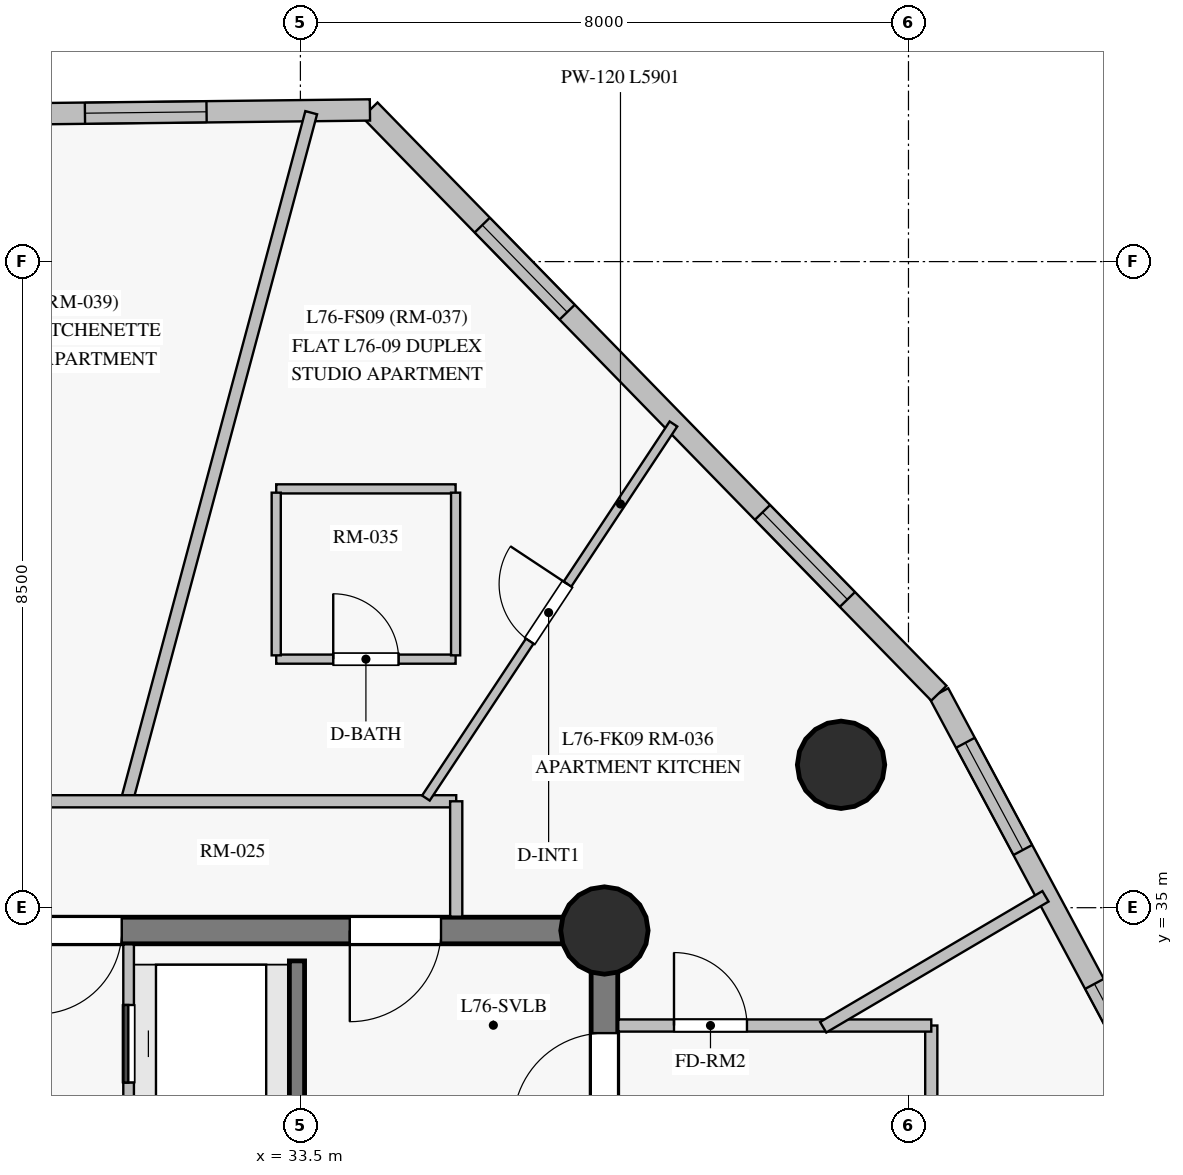
"""IFC4 building model, lengths in metres.
Left out: names, types, materials, properties, quantities, classifications, styles, units other than length and angle.
Written with IfcOpenShell. Run it as: python <this file> out.ifc"""

import sys

from ifc_helpers import new_model, si_unit, direction, frame, frame_2d, origin, origin_with_axes, origin_2d, place, context, subcontext, project, spatial, rectangle, circle, extrude, source, transform, mapped, element, fill, save


model = new_model("IFC4")
c1 = context("Model", 3, precision=1e-05, world=origin(), true_north=direction((0.0, 1.0)))
c2 = subcontext(c1, "Body", "Model", "MODEL_VIEW")
j1 = project(units=[si_unit("LENGTHUNIT", "METRE"), si_unit("PLANEANGLEUNIT", "RADIAN")], contexts=[c1])
p1 = place(None, origin())
s1 = spatial("IfcSite", under=j1, at=p1, CompositionType="ELEMENT")
p2 = place(p1, origin())
s2 = spatial("IfcBuilding", under=s1, at=p2, CompositionType="ELEMENT")
p3 = place(p2, frame((0.0, 0.0, 256.55)))
s3 = spatial("IfcBuildingStorey", under=s2, at=p3, CompositionType="ELEMENT", Elevation=256.55)
p4 = place(p3, frame((37.5, 18.3, 0.0), z_axis=(0.0, 0.0, 1.0), x_axis=(0.0, 1.0, 0.0)))
e1 = element("IfcWall", 1, at=p4, inside=s3, PredefinedType="SHEAR", context=c2, shape_type="SweptSolid", body=[
    extrude(rectangle(XDim=16.4, YDim=0.35, at=frame_2d((8.2, 0.0))), origin(), (0.0, 0.0, 1.0), 2.85),
])
p5 = place(p4, frame((13.85, 0.0, 0.0)))
e2 = element("IfcOpeningElement", 2, at=p5, cuts=e1, PredefinedType="OPENING", context=c2, shape_type="SweptSolid", body=[
    extrude(rectangle(XDim=1.2, YDim=2.15, at=frame_2d((0.6, 1.075))), frame((0.0, 0.185, 0.0), z_axis=(0.0, -1.0, 0.0), x_axis=(1.0, 0.0, 0.0)), (0.0, 0.0, 1.0), 0.37),
])
p6 = place(p3, frame((37.5, 34.7, 0.0), z_axis=(0.0, 0.0, 1.0), x_axis=(-1.0, 0.0, 0.0)))
e3 = element("IfcWall", 3, at=p6, inside=s3, PredefinedType="SHEAR", context=c2, shape_type="SweptSolid", body=[
    extrude(rectangle(XDim=10.95, YDim=0.35, at=frame_2d((5.475, 0.0))), origin(), (0.0, 0.0, 1.0), 2.85),
])
p7 = place(p6, frame((2.15, 0.0, 0.0)))
e4 = element("IfcOpeningElement", 4, at=p7, cuts=e3, PredefinedType="OPENING", context=c2, shape_type="SweptSolid", body=[
    extrude(rectangle(XDim=1.2, YDim=2.15, at=frame_2d((0.6, 1.075))), frame((0.0, 0.185, 0.0), z_axis=(0.0, -1.0, 0.0), x_axis=(1.0, 0.0, 0.0)), (0.0, 0.0, 1.0), 0.37),
])
p8 = place(p6, frame((6.35, 0.0, 0.0)))
e5 = element("IfcOpeningElement", 5, at=p8, cuts=e3, PredefinedType="OPENING", context=c2, shape_type="SweptSolid", body=[
    extrude(rectangle(XDim=1.1, YDim=2.15, at=frame_2d((0.55, 1.075))), frame((0.0, 0.185, 0.0), z_axis=(0.0, -1.0, 0.0), x_axis=(1.0, 0.0, 0.0)), (0.0, 0.0, 1.0), 0.37),
])
m1 = source(origin_with_axes(), c2, "Body", "SweptSolid", [
    extrude(circle(Radius=0.575, at=origin_2d()), origin(), (0.0, 0.0, 1.0), 3.05),
])
for number, where, z_axis, x_axis in (
    (6, (37.5, 34.7, 0.0), (0.0, 0.0, 1.0), (1.0, 0.0, 0.0)),
    (7, (40.613, 36.88, 0.0), (0.0, 0.0, 1.0), (1.0, 0.0, 0.0)),
):
    element("IfcColumn", number, at=place(p3, frame(where, z_axis=z_axis, x_axis=x_axis)), inside=s3, PredefinedType="COLUMN", context=c2, shape_type="MappedRepresentation", body=[
        mapped(m1, transform((0.0, 0.0, 0.0), scale=1.0)),
    ])
p9 = place(p3, frame((45.352, 31.372, 0.0), z_axis=(0.0, 0.0, 1.0), x_axis=(-0.471937066775, 0.881632239091, 0.0)))
e8 = element("IfcWall", 8, at=p9, inside=s3, PredefinedType="SOLIDWALL", context=c2, shape_type="SweptSolid", body=[
    extrude(rectangle(XDim=7.315, YDim=0.28, at=frame_2d((3.658, 0.0))), origin(), (0.0, 0.0, 1.0), 2.85),
])
p10 = place(p9, frame((1.378, 0.0, 0.85)))
e9 = element("IfcOpeningElement", 9, at=p10, cuts=e8, PredefinedType="OPENING", context=c2, shape_type="SweptSolid", body=[
    extrude(rectangle(XDim=1.6, YDim=1.6, at=frame_2d((0.8, 0.8))), frame((0.0, 0.15, 0.0), z_axis=(0.0, -1.0, 0.0), x_axis=(1.0, 0.0, 0.0)), (0.0, 0.0, 1.0), 0.3),
])
p11 = place(p9, frame((4.976, 0.0, 0.85)))
e10 = element("IfcOpeningElement", 10, at=p11, cuts=e8, PredefinedType="OPENING", context=c2, shape_type="SweptSolid", body=[
    extrude(rectangle(XDim=1.6, YDim=1.6, at=frame_2d((0.8, 0.8))), frame((0.0, 0.15, 0.0), z_axis=(0.0, -1.0, 0.0), x_axis=(1.0, 0.0, 0.0)), (0.0, 0.0, 1.0), 0.3),
])
p12 = place(p3, frame((41.9, 37.822, 0.0), z_axis=(0.0, 0.0, 1.0), x_axis=(-0.698260952417, 0.715843308504, 0.0)))
e11 = element("IfcWall", 11, at=p12, inside=s3, PredefinedType="SOLIDWALL", context=c2, shape_type="SweptSolid", body=[
    extrude(rectangle(XDim=10.72, YDim=0.28, at=frame_2d((5.36, 0.0))), origin(), (0.0, 0.0, 1.0), 2.85),
])
p13 = place(p12, frame((1.723, 0.0, 0.85)))
e12 = element("IfcOpeningElement", 12, at=p13, cuts=e11, PredefinedType="OPENING", context=c2, shape_type="SweptSolid", body=[
    extrude(rectangle(XDim=1.6, YDim=1.6, at=frame_2d((0.8, 0.8))), frame((0.0, 0.15, 0.0), z_axis=(0.0, -1.0, 0.0), x_axis=(1.0, 0.0, 0.0)), (0.0, 0.0, 1.0), 0.3),
])
p14 = place(p12, frame((7.003, 0.0, 0.85)))
e13 = element("IfcOpeningElement", 13, at=p14, cuts=e11, PredefinedType="OPENING", context=c2, shape_type="SweptSolid", body=[
    extrude(rectangle(XDim=1.6, YDim=1.6, at=frame_2d((0.8, 0.8))), frame((0.0, 0.15, 0.0), z_axis=(0.0, -1.0, 0.0), x_axis=(1.0, 0.0, 0.0)), (0.0, 0.0, 1.0), 0.3),
])
p15 = place(p3, frame((34.415, 45.495, 0.0), z_axis=(0.0, 0.0, 1.0), x_axis=(-0.999934770343, -0.011421692439, 0.0)))
e14 = element("IfcWall", 14, at=p15, inside=s3, PredefinedType="SOLIDWALL", context=c2, shape_type="SweptSolid", body=[
    extrude(rectangle(XDim=8.871, YDim=0.28, at=frame_2d((4.435, 0.0))), origin(), (0.0, 0.0, 1.0), 2.85),
])
p16 = place(p15, frame((2.149, 0.0, 0.85)))
e15 = element("IfcOpeningElement", 15, at=p16, cuts=e14, PredefinedType="OPENING", context=c2, shape_type="SweptSolid", body=[
    extrude(rectangle(XDim=1.6, YDim=1.6, at=frame_2d((0.8, 0.8))), frame((0.0, 0.15, 0.0), z_axis=(0.0, -1.0, 0.0), x_axis=(1.0, 0.0, 0.0)), (0.0, 0.0, 1.0), 0.3),
])
p17 = place(p15, frame((5.844, 0.0, 0.85)))
e16 = element("IfcOpeningElement", 16, at=p17, cuts=e14, PredefinedType="OPENING", context=c2, shape_type="SweptSolid", body=[
    extrude(rectangle(XDim=1.6, YDim=1.6, at=frame_2d((0.8, 0.8))), frame((0.0, 0.15, 0.0), z_axis=(0.0, -1.0, 0.0), x_axis=(1.0, 0.0, 0.0)), (0.0, 0.0, 1.0), 0.3),
])
p18 = place(p3, frame((33.455, 18.7, 0.0), z_axis=(0.0, 0.0, 1.0), x_axis=(0.0, 1.0, 0.0)))
e17 = element("IfcWall", 17, at=p18, inside=s3, PredefinedType="SHEAR", context=c2, shape_type="SweptSolid", body=[
    extrude(rectangle(XDim=15.6, YDim=0.2, at=frame_2d((7.8, 0.0))), origin(), (0.0, 0.0, 1.0), 2.85),
])
p19 = place(p18, frame((2.75, 0.0, 0.0)))
e18 = element("IfcOpeningElement", 18, at=p19, cuts=e17, PredefinedType="OPENING", context=c2, shape_type="SweptSolid", body=[
    extrude(rectangle(XDim=1.15, YDim=2.15, at=frame_2d((0.575, 1.075))), frame((0.0, 0.11, 0.0), z_axis=(0.0, -1.0, 0.0), x_axis=(1.0, 0.0, 0.0)), (0.0, 0.0, 1.0), 0.22),
])
p20 = place(p18, frame((0.55, 0.0, 0.0)))
e19 = element("IfcOpeningElement", 19, at=p20, cuts=e17, PredefinedType="OPENING", context=c2, shape_type="SweptSolid", body=[
    extrude(rectangle(XDim=0.94, YDim=2.1, at=frame_2d((0.47, 1.05))), frame((0.0, 0.11, 0.0), z_axis=(0.0, -1.0, 0.0), x_axis=(1.0, 0.0, 0.0)), (0.0, 0.0, 1.0), 0.22),
])
p21 = place(p3, frame((41.8, 33.45, 0.0), z_axis=(0.0, 0.0, 1.0), x_axis=(0.0, -1.0, 0.0)))
e20 = element("IfcWall", 20, at=p21, inside=s3, PredefinedType="PARTITIONING", context=c2, shape_type="SweptSolid", body=[
    extrude(rectangle(XDim=19.6, YDim=0.16, at=frame_2d((9.8, 0.0))), origin(), (0.0, 0.0, 1.0), 2.3),
])
p22 = place(p21, frame((9.325, 0.0, 0.0)))
e21 = element("IfcOpeningElement", 21, at=p22, cuts=e20, PredefinedType="OPENING", context=c2, shape_type="SweptSolid", body=[
    extrude(rectangle(XDim=0.96, YDim=2.15, at=frame_2d((0.48, 1.075))), frame((0.0, 0.09, 0.0), z_axis=(0.0, -1.0, 0.0), x_axis=(1.0, 0.0, 0.0)), (0.0, 0.0, 1.0), 0.18),
])
p23 = place(p21, frame((4.335, 0.0, 0.0)))
e22 = element("IfcOpeningElement", 22, at=p23, cuts=e20, PredefinedType="OPENING", context=c2, shape_type="SweptSolid", body=[
    extrude(rectangle(XDim=0.96, YDim=2.15, at=frame_2d((0.48, 1.075))), frame((0.0, 0.09, 0.0), z_axis=(0.0, -1.0, 0.0), x_axis=(1.0, 0.0, 0.0)), (0.0, 0.0, 1.0), 0.18),
])
p24 = place(p3, frame((31.207, 36.371, 0.0), z_axis=(0.0, 0.0, 1.0), x_axis=(0.258815637699, 0.965926739294, 0.0)))
e23 = element("IfcWall", 23, at=p24, inside=s3, PredefinedType="PARTITIONING", context=c2, shape_type="SweptSolid", body=[
    extrude(rectangle(XDim=9.408, YDim=0.16, at=frame_2d((4.704, 0.0))), origin(), (0.0, 0.0, 1.0), 2.85),
])
p25 = place(p3, frame((28.6, 36.4, 0.0), z_axis=(0.0, 0.0, 1.0), x_axis=(1.0, 0.0, 0.0)))
e24 = element("IfcWall", 24, at=p25, inside=s3, PredefinedType="PARTITIONING", context=c2, shape_type="SweptSolid", body=[
    extrude(rectangle(XDim=6.95, YDim=0.16, at=frame_2d((3.475, 0.0))), origin(), (0.0, 0.0, 1.0), 2.45),
])
p26 = place(p3, frame((35.151, 36.442, 0.0), z_axis=(0.0, 0.0, 1.0), x_axis=(0.551852093065, 0.833942004806, 0.0)))
e25 = element("IfcWall", 25, at=p26, inside=s3, PredefinedType="PARTITIONING", context=c2, shape_type="SweptSolid", body=[
    extrude(rectangle(XDim=5.902, YDim=0.12, at=frame_2d((2.951, 0.0))), origin(), (0.0, 0.0, 1.0), 2.85),
])
p27 = place(p26, frame((2.476, 0.0, 0.0)))
e26 = element("IfcOpeningElement", 26, at=p27, cuts=e25, PredefinedType="OPENING", context=c2, shape_type="SweptSolid", body=[
    extrude(rectangle(XDim=0.9, YDim=2.1, at=frame_2d((0.45, 1.05))), frame((0.0, 0.07, 0.0), z_axis=(0.0, -1.0, 0.0), x_axis=(1.0, 0.0, 0.0)), (0.0, 0.0, 1.0), 0.14),
])
p28 = place(p3, frame((37.682, 33.45, 0.0), z_axis=(0.0, 0.0, 1.0), x_axis=(1.0, 0.0, 0.0)))
e27 = element("IfcWall", 27, at=p28, inside=s3, PredefinedType="PARTITIONING", context=c2, shape_type="SweptSolid", body=[
    extrude(rectangle(XDim=4.118, YDim=0.16, at=frame_2d((2.059, 0.0))), origin(), (0.0, 0.0, 1.0), 2.85),
])
p29 = place(p28, frame((0.733, 0.0, 0.0)))
e28 = element("IfcOpeningElement", 28, at=p29, cuts=e27, PredefinedType="OPENING", context=c2, shape_type="SweptSolid", body=[
    extrude(rectangle(XDim=0.96, YDim=2.15, at=frame_2d((0.48, 1.075))), frame((0.0, 0.09, 0.0), z_axis=(0.0, -1.0, 0.0), x_axis=(1.0, 0.0, 0.0)), (0.0, 0.0, 1.0), 0.18),
])
p30 = place(p3, frame((31.24, 30.45, 0.0), z_axis=(0.0, 0.0, 1.0), x_axis=(0.0, 1.0, 0.0)))
e29 = element("IfcWall", 29, at=p30, inside=s3, PredefinedType="PARTITIONING", context=c2, shape_type="SweptSolid", body=[
    extrude(rectangle(XDim=4.068, YDim=0.14, at=frame_2d((2.034, 0.0))), origin(), (0.0, 0.0, 1.0), 2.85),
])
p31 = place(p30, frame((0.35, 0.0, 0.0)))
e30 = element("IfcOpeningElement", 30, at=p31, cuts=e29, PredefinedType="OPENING", context=c2, shape_type="SweptSolid", body=[
    extrude(rectangle(XDim=1.02, YDim=2.15, at=frame_2d((0.51, 1.075))), frame((0.0, 0.08, 0.0), z_axis=(0.0, -1.0, 0.0), x_axis=(1.0, 0.0, 0.0)), (0.0, 0.0, 1.0), 0.16),
])
p32 = place(p30, frame((2.25, 0.0, 0.0)))
e31 = element("IfcOpeningElement", 31, at=p32, cuts=e29, PredefinedType="OPENING", context=c2, shape_type="SweptSolid", body=[
    extrude(rectangle(XDim=1.02, YDim=2.15, at=frame_2d((0.51, 1.075))), frame((0.0, 0.08, 0.0), z_axis=(0.0, -1.0, 0.0), x_axis=(1.0, 0.0, 0.0)), (0.0, 0.0, 1.0), 0.16),
])
p33 = place(p3, frame((40.378, 33.427, 0.0), z_axis=(0.0, 0.0, 1.0), x_axis=(0.861628913846, 0.507538781597, 0.0)))
e32 = element("IfcWall", 32, at=p33, inside=s3, PredefinedType="PARTITIONING", context=c2, shape_type="SweptSolid", body=[
    extrude(rectangle(XDim=3.394, YDim=0.16, at=frame_2d((1.697, 0.0))), origin(), (0.0, 0.0, 1.0), 2.85),
])
p34 = place(p3, frame((33.182, 38.27, 0.0), z_axis=(0.0, 0.0, 1.0), x_axis=(1.0, 0.0, 0.0)))
e33 = element("IfcWall", 33, at=p34, inside=s3, PredefinedType="PARTITIONING", context=c2, shape_type="SweptSolid", body=[
    extrude(rectangle(XDim=2.36, YDim=0.12, at=frame_2d((1.18, 0.0))), origin(), (0.0, 0.0, 1.0), 2.3),
])
p35 = place(p34, frame((0.75, 0.0, 0.0)))
e34 = element("IfcOpeningElement", 34, at=p35, cuts=e33, PredefinedType="OPENING", context=c2, shape_type="SweptSolid", body=[
    extrude(rectangle(XDim=0.86, YDim=2.1, at=frame_2d((0.43, 1.05))), frame((0.0, 0.07, 0.0), z_axis=(0.0, -1.0, 0.0), x_axis=(1.0, 0.0, 0.0)), (0.0, 0.0, 1.0), 0.14),
])
p36 = place(p3, frame((35.542, 40.51, 0.0), z_axis=(0.0, 0.0, 1.0), x_axis=(-1.0, 0.0, 0.0)))
e35 = element("IfcWall", 35, at=p36, inside=s3, PredefinedType="PARTITIONING", context=c2, shape_type="SweptSolid", body=[
    extrude(rectangle(XDim=2.36, YDim=0.12, at=frame_2d((1.18, 0.0))), origin(), (0.0, 0.0, 1.0), 2.85),
])
for number, where, z_axis, x_axis in (
    (36, (35.542, 38.32, 0.0), (0.0, 0.0, 1.0), (0.0, 1.0, 0.0)),
    (37, (33.182, 40.46, 0.0), (0.0, 0.0, 1.0), (0.0, -1.0, 0.0)),
):
    element("IfcWall", number, at=place(p3, frame(where, z_axis=z_axis, x_axis=x_axis)), inside=s3, PredefinedType="PARTITIONING", context=c2, shape_type="SweptSolid", body=[
        extrude(rectangle(XDim=2.14, YDim=0.12, at=frame_2d((1.07, 0.0))), origin(), (0.0, 0.0, 1.0), 2.85),
    ])
p37 = place(p3, frame((35.55, 36.4, 0.0), z_axis=(0.0, 0.0, 1.0), x_axis=(0.0, -1.0, 0.0)))
e38 = element("IfcWall", 38, at=p37, inside=s3, PredefinedType="PARTITIONING", context=c2, shape_type="SweptSolid", body=[
    extrude(rectangle(XDim=1.518, YDim=0.16, at=frame_2d((0.759, 0.0))), origin(), (0.0, 0.0, 1.0), 2.85),
])
m2 = source(origin_with_axes(), c2, "Body", "SweptSolid", [
    extrude(rectangle(XDim=1.6, YDim=1.6, at=frame_2d((0.8, 0.8))), frame((0.0, 0.03, 0.0), z_axis=(0.0, -1.0, 0.0), x_axis=(1.0, 0.0, 0.0)), (0.0, 0.0, 1.0), 0.06),
])
p38 = place(p10, origin())
e39 = element("IfcWindow", 39, at=p38, inside=s3, PartitioningType="SINGLE_PANEL", PredefinedType="WINDOW", context=c2, shape_type="MappedRepresentation", body=[
    mapped(m2, transform((0.0, 0.0, 0.0), scale=1.0)),
])
fill(e9, e39)
p39 = place(p11, origin())
e40 = element("IfcWindow", 40, at=p39, inside=s3, PartitioningType="SINGLE_PANEL", PredefinedType="WINDOW", context=c2, shape_type="MappedRepresentation", body=[
    mapped(m2, transform((0.0, 0.0, 0.0), scale=1.0)),
])
fill(e10, e40)
p40 = place(p13, origin())
e41 = element("IfcWindow", 41, at=p40, inside=s3, PartitioningType="SINGLE_PANEL", PredefinedType="WINDOW", context=c2, shape_type="MappedRepresentation", body=[
    mapped(m2, transform((0.0, 0.0, 0.0), scale=1.0)),
])
fill(e12, e41)
p41 = place(p14, origin())
e42 = element("IfcWindow", 42, at=p41, inside=s3, PartitioningType="SINGLE_PANEL", PredefinedType="WINDOW", context=c2, shape_type="MappedRepresentation", body=[
    mapped(m2, transform((0.0, 0.0, 0.0), scale=1.0)),
])
fill(e13, e42)
p42 = place(p16, origin())
e43 = element("IfcWindow", 43, at=p42, inside=s3, PartitioningType="SINGLE_PANEL", PredefinedType="WINDOW", context=c2, shape_type="MappedRepresentation", body=[
    mapped(m2, transform((0.0, 0.0, 0.0), scale=1.0)),
])
fill(e15, e43)
m3 = source(origin_with_axes(), c2, "Body", "SweptSolid", [
    extrude(rectangle(XDim=1.2, YDim=2.15, at=frame_2d((0.6, 1.075))), frame((0.0, 0.025, 0.0), z_axis=(0.0, -1.0, 0.0), x_axis=(1.0, 0.0, 0.0)), (0.0, 0.0, 1.0), 0.05),
])
p43 = place(p5, origin())
e44 = element("IfcDoor", 44, at=p43, inside=s3, OperationType="SINGLE_SWING_LEFT", PredefinedType="DOOR", context=c2, shape_type="MappedRepresentation", body=[
    mapped(m3, transform((0.0, 0.0, 0.0), scale=1.0)),
])
fill(e2, e44)
p44 = place(p7, origin())
e45 = element("IfcDoor", 45, at=p44, inside=s3, OperationType="SINGLE_SWING_RIGHT", PredefinedType="DOOR", context=c2, shape_type="MappedRepresentation", body=[
    mapped(m3, transform((0.0, 0.0, 0.0), scale=1.0)),
])
fill(e4, e45)
m4 = source(origin_with_axes(), c2, "Body", "SweptSolid", [
    extrude(rectangle(XDim=1.1, YDim=2.15, at=frame_2d((0.55, 1.075))), frame((0.0, 0.025, 0.0), z_axis=(0.0, -1.0, 0.0), x_axis=(1.0, 0.0, 0.0)), (0.0, 0.0, 1.0), 0.05),
])
p45 = place(p8, origin())
e46 = element("IfcDoor", 46, at=p45, inside=s3, OperationType="SINGLE_SWING_RIGHT", PredefinedType="DOOR", context=c2, shape_type="MappedRepresentation", body=[
    mapped(m4, transform((0.0, 0.0, 0.0), scale=1.0)),
])
fill(e5, e46)
m5 = source(origin_with_axes(), c2, "Body", "SweptSolid", [
    extrude(rectangle(XDim=1.02, YDim=2.15, at=frame_2d((0.51, 1.075))), frame((0.0, 0.025, 0.0), z_axis=(0.0, -1.0, 0.0), x_axis=(1.0, 0.0, 0.0)), (0.0, 0.0, 1.0), 0.05),
])
p46 = place(p32, origin())
e47 = element("IfcDoor", 47, at=p46, inside=s3, OperationType="SLIDING_TO_LEFT", PredefinedType="DOOR", context=c2, shape_type="MappedRepresentation", body=[
    mapped(m5, transform((0.0, 0.0, 0.0), scale=1.0)),
])
fill(e31, e47)
m6 = source(origin_with_axes(), c2, "Body", "SweptSolid", [
    extrude(rectangle(XDim=0.86, YDim=2.1, at=frame_2d((0.43, 1.05))), frame((0.0, 0.025, 0.0), z_axis=(0.0, -1.0, 0.0), x_axis=(1.0, 0.0, 0.0)), (0.0, 0.0, 1.0), 0.05),
])
p47 = place(p35, origin())
e48 = element("IfcDoor", 48, at=p47, inside=s3, OperationType="SINGLE_SWING_LEFT", PredefinedType="DOOR", context=c2, shape_type="MappedRepresentation", body=[
    mapped(m6, transform((0.0, 0.0, 0.0), scale=1.0)),
])
fill(e34, e48)
m7 = source(origin_with_axes(), c2, "Body", "SweptSolid", [
    extrude(rectangle(XDim=0.9, YDim=2.1, at=frame_2d((0.45, 1.05))), frame((0.0, 0.025, 0.0), z_axis=(0.0, -1.0, 0.0), x_axis=(1.0, 0.0, 0.0)), (0.0, 0.0, 1.0), 0.05),
])
p48 = place(p27, origin())
e49 = element("IfcDoor", 49, at=p48, inside=s3, OperationType="SINGLE_SWING_RIGHT", PredefinedType="DOOR", context=c2, shape_type="MappedRepresentation", body=[
    mapped(m7, transform((0.0, 0.0, 0.0), scale=1.0)),
])
fill(e26, e49)
m8 = source(origin_with_axes(), c2, "Body", "SweptSolid", [
    extrude(rectangle(XDim=0.96, YDim=2.15, at=frame_2d((0.48, 1.075))), frame((0.0, 0.025, 0.0), z_axis=(0.0, -1.0, 0.0), x_axis=(1.0, 0.0, 0.0)), (0.0, 0.0, 1.0), 0.05),
])
p49 = place(p29, origin())
e50 = element("IfcDoor", 50, at=p49, inside=s3, OperationType="SINGLE_SWING_LEFT", PredefinedType="DOOR", context=c2, shape_type="MappedRepresentation", body=[
    mapped(m8, transform((0.0, 0.0, 0.0), scale=1.0)),
])
fill(e28, e50)
save(model, sys.argv[1])
